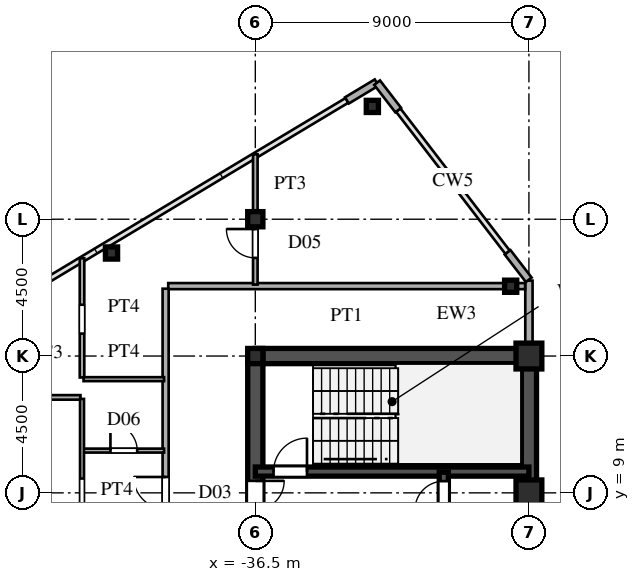
"""IFC4 building model, lengths in metres.
Left out: names, types, materials, properties, quantities, classifications, styles, units other than length and angle.
Written with IfcOpenShell. Run it as: python <this file> out.ifc"""

import sys

from ifc_helpers import new_model, si_unit, direction, frame, frame_2d, origin, origin_2d, place, context, subcontext, project, spatial, rectangle, hollow_rectangle, i_section, extrude, source, transform, mapped, element, fill, save


model = new_model("IFC4")
c1 = context("Model", 3, precision=1e-05, world=origin(), true_north=direction((0.0, 1.0)))
c2 = subcontext(c1, "Body", "Model", "MODEL_VIEW")
j1 = project(units=[si_unit("LENGTHUNIT", "METRE"), si_unit("PLANEANGLEUNIT", "RADIAN")], contexts=[c1])
p1 = place(None, origin())
s1 = spatial("IfcSite", under=j1, at=p1, CompositionType="ELEMENT")
p2 = place(p1, origin())
s2 = spatial("IfcBuilding", under=s1, at=p2, CompositionType="ELEMENT")
p3 = place(p2, frame((0.0, 0.0, 221.1)))
s3 = spatial("IfcBuildingStorey", under=s2, at=p3, CompositionType="ELEMENT", Elevation=221.1)
m1 = source(origin(), c2, "Body", "SweptSolid", [
    extrude(hollow_rectangle(XDim=0.85, YDim=0.85, WallThickness=0.036, at=origin_2d()), origin(), (0.0, 0.0, 1.0), 3.6),
])
for number, where, z_axis, x_axis in (
    (1, (-27.5, 9.0, 0.0), (0.0, 0.0, 1.0), (1.0, 0.0, 0.0)),
    (2, (-27.5, 13.5, 0.0), (0.0, 0.0, 1.0), (1.0, 0.0, 0.0)),
):
    element("IfcColumn", number, at=place(p3, frame(where, z_axis=z_axis, x_axis=x_axis)), inside=s3, PredefinedType="COLUMN", context=c2, shape_type="MappedRepresentation", body=[
        mapped(m1, transform((0.0, 0.0, 0.0), scale=1.0)),
    ])
m2 = source(origin(), c2, "Body", "SweptSolid", [
    extrude(i_section(OverallWidth=0.5, OverallDepth=0.5, WebThickness=0.02, FlangeThickness=0.032, at=origin_2d()), origin(), (0.0, 0.0, 1.0), 3.6),
])
for number, where, z_axis, x_axis in (
    (3, (-36.5, 13.5, 0.0), (0.0, 0.0, 1.0), (1.0, 0.0, 0.0)),
    (4, (-36.5, 18.0, 0.0), (0.0, 0.0, 1.0), (1.0, 0.0, 0.0)),
):
    element("IfcColumn", number, at=place(p3, frame(where, z_axis=z_axis, x_axis=x_axis)), inside=s3, PredefinedType="COLUMN", context=c2, shape_type="MappedRepresentation", body=[
        mapped(m2, transform((0.0, 0.0, 0.0), scale=1.0)),
    ])
m3 = source(origin(), c2, "Body", "SweptSolid", [
    extrude(hollow_rectangle(XDim=0.4, YDim=0.4, WallThickness=0.016, at=origin_2d()), origin(), (0.0, 0.0, 1.0), 3.6),
])
for number, where, z_axis, x_axis in (
    (5, (-28.1, 15.796, 0.0), (0.0, 0.0, 1.0), (1.0, 0.0, 0.0)),
    (6, (-32.65, 21.71, 0.0), (0.0, 0.0, 1.0), (1.0, 0.0, 0.0)),
    (7, (-41.23, 16.889, 0.0), (0.0, 0.0, 1.0), (1.0, 0.0, 0.0)),
):
    element("IfcColumn", number, at=place(p3, frame(where, z_axis=z_axis, x_axis=x_axis)), inside=s3, PredefinedType="COLUMN", context=c2, shape_type="MappedRepresentation", body=[
        mapped(m3, transform((0.0, 0.0, 0.0), scale=1.0)),
    ])
p4 = place(p3, frame((-27.5, 13.755, 0.0), z_axis=(0.0, 0.0, 1.0), x_axis=(0.0, 1.0, 0.0)))
e8 = element("IfcWall", 8, at=p4, inside=s3, PredefinedType="SOLIDWALL", context=c2, shape_type="SweptSolid", body=[
    extrude(rectangle(XDim=0.62, YDim=0.24, at=frame_2d((0.31, 0.0))), origin(), (0.0, 0.0, 1.0), 2.84),
])
p5 = place(p3, frame((-27.5, 14.375, 0.0), z_axis=(0.0, 0.0, 1.0), x_axis=(0.0, 1.0, 0.0)))
e9 = element("IfcWall", 9, at=p5, inside=s3, PredefinedType="SOLIDWALL", context=c2, shape_type="SweptSolid", body=[
    extrude(rectangle(XDim=1.605, YDim=0.24, at=frame_2d((0.803, 0.0))), origin(), (0.0, 0.0, 1.0), 3.34),
])
for number, where, z_axis, x_axis in (
    (10, (-27.506, 16.008, 0.0), (0.0, 0.0, 1.0), (-0.61, 0.793, 0.0)),
    (11, (-31.799, 21.588, 0.0), (0.0, 0.0, 1.0), (-0.61, 0.793, 0.0)),
    (12, (-32.509, 22.495, 0.0), (0.0, 0.0, 1.0), (-0.857, -0.515, 0.0)),
):
    element("IfcWall", number, at=place(p3, frame(where, z_axis=z_axis, x_axis=x_axis)), inside=s3, PredefinedType="SOLIDWALL", context=c2, shape_type="SweptSolid", body=[
        extrude(rectangle(XDim=1.14, YDim=0.24, at=frame_2d((0.57, 0.0))), origin(), (0.0, 0.0, 1.0), 3.34),
    ])
p6 = place(p3, frame((-27.5, 1.3, 0.0), z_axis=(0.0, 0.0, 1.0), x_axis=(0.0, 1.0, 0.0)))
e13 = element("IfcWall", 13, at=p6, inside=s3, PredefinedType="SHEAR", context=c2, shape_type="SweptSolid", body=[
    extrude(rectangle(XDim=12.2, YDim=0.5, at=frame_2d((6.1, 0.0))), origin(), (0.0, 0.0, 1.0), 3.34),
])
p7 = place(p3, frame((-36.5, 13.5, 0.0), z_axis=(0.0, 0.0, 1.0), x_axis=(1.0, 0.0, 0.0)))
e14 = element("IfcWall", 14, at=p7, inside=s3, PredefinedType="SHEAR", context=c2, shape_type="SweptSolid", body=[
    extrude(rectangle(XDim=9.0, YDim=0.5, at=frame_2d((4.5, 0.0))), origin(), (0.0, 0.0, 1.0), 3.34),
])
p8 = place(p3, frame((-36.5, 8.2, 0.0), z_axis=(0.0, 0.0, 1.0), x_axis=(0.0, 1.0, 0.0)))
e15 = element("IfcWall", 15, at=p8, inside=s3, PredefinedType="SHEAR", context=c2, shape_type="SweptSolid", body=[
    extrude(rectangle(XDim=5.45, YDim=0.5, at=frame_2d((2.725, 0.0))), origin(), (0.0, 0.0, 1.0), 3.34),
])
p9 = place(p8, frame((0.245, 0.0, 0.0)))
e16 = element("IfcOpeningElement", 16, at=p9, cuts=e15, PredefinedType="OPENING", context=c2, shape_type="SweptSolid", body=[
    extrude(rectangle(XDim=0.95, YDim=2.15, at=frame_2d((0.475, 1.075))), frame((0.0, 0.26, 0.0), z_axis=(0.0, -1.0, 0.0), x_axis=(1.0, 0.0, 0.0)), (0.0, 0.0, 1.0), 0.52),
])
p10 = place(p3, frame((-36.5, 9.7, 0.0), z_axis=(0.0, 0.0, 1.0), x_axis=(1.0, 0.0, 0.0)))
e17 = element("IfcWall", 17, at=p10, inside=s3, PredefinedType="SHEAR", context=c2, shape_type="SweptSolid", body=[
    extrude(rectangle(XDim=9.0, YDim=0.3, at=frame_2d((4.5, 0.0))), origin(), (0.0, 0.0, 1.0), 3.34),
])
p11 = place(p10, frame((0.6, 0.0, 0.0)))
e18 = element("IfcOpeningElement", 18, at=p11, cuts=e17, PredefinedType="OPENING", context=c2, shape_type="SweptSolid", body=[
    extrude(rectangle(XDim=1.1, YDim=2.2, at=frame_2d((0.55, 1.1))), frame((0.0, 0.16, 0.0), z_axis=(0.0, -1.0, 0.0), x_axis=(1.0, 0.0, 0.0)), (0.0, 0.0, 1.0), 0.32),
])
p12 = place(p3, frame((-30.3, 8.15, 0.0), z_axis=(0.0, 0.0, 1.0), x_axis=(0.0, 1.0, 0.0)))
e19 = element("IfcWall", 19, at=p12, inside=s3, PredefinedType="SHEAR", context=c2, shape_type="SweptSolid", body=[
    extrude(rectangle(XDim=1.53, YDim=0.3, at=frame_2d((0.765, 0.0))), origin(), (0.0, 0.0, 1.0), 3.34),
])
p13 = place(p12, frame((0.285, 0.0, 0.0)))
e20 = element("IfcOpeningElement", 20, at=p13, cuts=e19, PredefinedType="OPENING", context=c2, shape_type="SweptSolid", body=[
    extrude(rectangle(XDim=0.95, YDim=2.15, at=frame_2d((0.475, 1.075))), frame((0.0, 0.16, 0.0), z_axis=(0.0, -1.0, 0.0), x_axis=(1.0, 0.0, 0.0)), (0.0, 0.0, 1.0), 0.32),
])
p14 = place(p3, frame((-42.15, 10.39, 0.0), z_axis=(0.0, 0.0, 1.0), x_axis=(1.0, 0.0, 0.0)))
e21 = element("IfcWall", 21, at=p14, inside=s3, PredefinedType="PARTITIONING", context=c2, shape_type="SweptSolid", body=[
    extrude(rectangle(XDim=2.65, YDim=0.13, at=frame_2d((1.325, 0.0))), origin(), (0.0, 0.0, 1.0), 3.34),
])
p15 = place(p14, frame((0.885, 0.0, 0.0)))
e22 = element("IfcOpeningElement", 22, at=p15, cuts=e21, PredefinedType="OPENING", context=c2, shape_type="SweptSolid", body=[
    extrude(rectangle(XDim=0.88, YDim=2.1, at=frame_2d((0.44, 1.05))), frame((0.0, 0.075, 0.0), z_axis=(0.0, -1.0, 0.0), x_axis=(1.0, 0.0, 0.0)), (0.0, 0.0, 1.0), 0.15),
])
p16 = place(p3, frame((-49.802, 12.14, 0.0), z_axis=(0.0, 0.0, 1.0), x_axis=(1.0, 0.0, 0.0)))
e23 = element("IfcWall", 23, at=p16, inside=s3, PredefinedType="PARTITIONING", context=c2, shape_type="SweptSolid", body=[
    extrude(rectangle(XDim=7.552, YDim=0.15, at=frame_2d((3.776, 0.0))), origin(), (0.0, 0.0, 1.0), 3.34),
])
p17 = place(p16, frame((3.002, 0.0, 0.0)))
e24 = element("IfcOpeningElement", 24, at=p17, cuts=e23, PredefinedType="OPENING", context=c2, shape_type="SweptSolid", body=[
    extrude(rectangle(XDim=0.95, YDim=2.15, at=frame_2d((0.475, 1.075))), frame((0.0, 0.085, 0.0), z_axis=(0.0, -1.0, 0.0), x_axis=(1.0, 0.0, 0.0)), (0.0, 0.0, 1.0), 0.17),
])
p18 = place(p3, frame((-42.15, 12.74, 0.0), z_axis=(0.0, 0.0, 1.0), x_axis=(1.0, 0.0, 0.0)))
e25 = element("IfcWall", 25, at=p18, inside=s3, PredefinedType="PARTITIONING", context=c2, shape_type="SweptSolid", body=[
    extrude(rectangle(XDim=2.65, YDim=0.13, at=frame_2d((1.325, 0.0))), origin(), (0.0, 0.0, 1.0), 3.34),
])
p19 = place(p3, frame((-39.365, 15.8, 0.0), z_axis=(0.0, 0.0, 1.0), x_axis=(1.0, 0.0, 0.0)))
e26 = element("IfcWall", 26, at=p19, inside=s3, PredefinedType="PARTITIONING", context=c2, shape_type="SweptSolid", body=[
    extrude(rectangle(XDim=11.74, YDim=0.2, at=frame_2d((5.87, 0.0))), origin(), (0.0, 0.0, 1.0), 3.34),
])
p20 = place(p3, frame((-42.2, 3.812, 0.0), z_axis=(0.0, 0.0, 1.0), x_axis=(0.0, 1.0, 0.0)))
e27 = element("IfcWall", 27, at=p20, inside=s3, PredefinedType="PARTITIONING", context=c2, shape_type="SweptSolid", body=[
    extrude(rectangle(XDim=8.278, YDim=0.13, at=frame_2d((4.139, 0.0))), origin(), (0.0, 0.0, 1.0), 3.34),
])
p21 = place(p20, frame((4.71, 0.0, 0.0)))
e28 = element("IfcOpeningElement", 28, at=p21, cuts=e27, PredefinedType="OPENING", context=c2, shape_type="SweptSolid", body=[
    extrude(rectangle(XDim=0.95, YDim=2.15, at=frame_2d((0.475, 1.075))), frame((0.0, 0.075, 0.0), z_axis=(0.0, -1.0, 0.0), x_axis=(1.0, 0.0, 0.0)), (0.0, 0.0, 1.0), 0.15),
])
p22 = place(p3, frame((-42.2, 12.795, 0.0), z_axis=(0.0, 0.0, 1.0), x_axis=(0.0, 1.0, 0.0)))
e29 = element("IfcWall", 29, at=p22, inside=s3, PredefinedType="PARTITIONING", context=c2, shape_type="SweptSolid", body=[
    extrude(rectangle(XDim=3.92, YDim=0.15, at=frame_2d((1.96, 0.0))), origin(), (0.0, 0.0, 1.0), 3.34),
])
p23 = place(p22, frame((1.442, 0.0, 0.0)))
e30 = element("IfcOpeningElement", 30, at=p23, cuts=e29, PredefinedType="OPENING", context=c2, shape_type="SweptSolid", body=[
    extrude(rectangle(XDim=0.95, YDim=2.15, at=frame_2d((0.475, 1.075))), frame((0.0, 0.085, 0.0), z_axis=(0.0, -1.0, 0.0), x_axis=(1.0, 0.0, 0.0)), (0.0, 0.0, 1.0), 0.17),
])
p24 = place(p3, frame((-39.45, -15.715, 0.0), z_axis=(0.0, 0.0, 1.0), x_axis=(0.0, 1.0, 0.0)))
e31 = element("IfcWall", 31, at=p24, inside=s3, PredefinedType="PARTITIONING", context=c2, shape_type="SweptSolid", body=[
    extrude(rectangle(XDim=31.43, YDim=0.2, at=frame_2d((15.715, 0.0))), origin(), (0.0, 0.0, 1.0), 3.34),
])
p25 = place(p24, frame((4.69, 0.0, 0.0)))
e32 = element("IfcOpeningElement", 32, at=p25, cuts=e31, PredefinedType="OPENING", context=c2, shape_type="SweptSolid", body=[
    extrude(rectangle(XDim=1.05, YDim=2.25, at=frame_2d((0.525, 1.125))), frame((0.0, 0.11, 0.0), z_axis=(0.0, -1.0, 0.0), x_axis=(1.0, 0.0, 0.0)), (0.0, 0.0, 1.0), 0.22),
])
p26 = place(p24, frame((16.198, 0.0, 0.0)))
e33 = element("IfcOpeningElement", 33, at=p26, cuts=e31, PredefinedType="OPENING", context=c2, shape_type="SweptSolid", body=[
    extrude(rectangle(XDim=1.05, YDim=2.25, at=frame_2d((0.525, 1.125))), frame((0.0, 0.11, 0.0), z_axis=(0.0, -1.0, 0.0), x_axis=(1.0, 0.0, 0.0)), (0.0, 0.0, 1.0), 0.22),
])
p27 = place(p24, frame((24.188, 0.0, 0.0)))
e34 = element("IfcOpeningElement", 34, at=p27, cuts=e31, PredefinedType="OPENING", context=c2, shape_type="SweptSolid", body=[
    extrude(rectangle(XDim=1.05, YDim=2.25, at=frame_2d((0.525, 1.125))), frame((0.0, 0.11, 0.0), z_axis=(0.0, -1.0, 0.0), x_axis=(1.0, 0.0, 0.0)), (0.0, 0.0, 1.0), 0.22),
])
p28 = place(p3, frame((-36.5, 15.85, 0.0), z_axis=(0.0, 0.0, 1.0), x_axis=(0.0, 1.0, 0.0)))
e35 = element("IfcWall", 35, at=p28, inside=s3, PredefinedType="PARTITIONING", context=c2, shape_type="SweptSolid", body=[
    extrude(rectangle(XDim=2.17, YDim=0.15, at=frame_2d((1.085, 0.0))), origin(), (0.0, 0.0, 1.0), 2.44),
])
p29 = place(p28, frame((0.878, 0.0, 0.0)))
e36 = element("IfcOpeningElement", 36, at=p29, cuts=e35, PredefinedType="OPENING", context=c2, shape_type="SweptSolid", body=[
    extrude(rectangle(XDim=0.95, YDim=2.15, at=frame_2d((0.475, 1.075))), frame((0.0, 0.085, 0.0), z_axis=(0.0, -1.0, 0.0), x_axis=(1.0, 0.0, 0.0)), (0.0, 0.0, 1.0), 0.17),
])
p30 = place(p3, frame((-36.5, 18.02, 0.0), z_axis=(0.0, 0.0, 1.0), x_axis=(0.0, 1.0, 0.0)))
e37 = element("IfcWall", 37, at=p30, inside=s3, PredefinedType="PARTITIONING", context=c2, shape_type="SweptSolid", body=[
    extrude(rectangle(XDim=2.115, YDim=0.15, at=frame_2d((1.058, 0.0))), origin(), (0.0, 0.0, 1.0), 3.34),
])
m4 = source(origin(), c2, "Body", "SweptSolid", [
    extrude(rectangle(XDim=0.95, YDim=2.15, at=frame_2d((0.475, 1.075))), frame((0.0, 0.025, 0.0), z_axis=(0.0, -1.0, 0.0), x_axis=(1.0, 0.0, 0.0)), (0.0, 0.0, 1.0), 0.05),
])
p31 = place(p9, frame((0.95, 0.0, 0.0), z_axis=(0.0, 0.0, 1.0), x_axis=(-1.0, 0.0, 0.0)))
e38 = element("IfcDoor", 38, at=p31, inside=s3, OperationType="SINGLE_SWING_RIGHT", PredefinedType="DOOR", context=c2, shape_type="MappedRepresentation", body=[
    mapped(m4, transform((0.0, 0.0, 0.0), scale=1.0)),
])
fill(e16, e38)
m5 = source(origin(), c2, "Body", "SweptSolid", [
    extrude(rectangle(XDim=1.1, YDim=2.2, at=frame_2d((0.55, 1.1))), frame((0.0, 0.025, 0.0), z_axis=(0.0, -1.0, 0.0), x_axis=(1.0, 0.0, 0.0)), (0.0, 0.0, 1.0), 0.05),
])
p32 = place(p11, origin())
e39 = element("IfcDoor", 39, at=p32, inside=s3, OperationType="SINGLE_SWING_RIGHT", PredefinedType="DOOR", context=c2, shape_type="MappedRepresentation", body=[
    mapped(m5, transform((0.0, 0.0, 0.0), scale=1.0)),
])
fill(e18, e39)
p33 = place(p13, origin())
e40 = element("IfcDoor", 40, at=p33, inside=s3, OperationType="SINGLE_SWING_LEFT", PredefinedType="DOOR", context=c2, shape_type="MappedRepresentation", body=[
    mapped(m4, transform((0.0, 0.0, 0.0), scale=1.0)),
])
fill(e20, e40)
m6 = source(origin(), c2, "Body", "SweptSolid", [
    extrude(rectangle(XDim=0.88, YDim=2.1, at=frame_2d((0.44, 1.05))), frame((0.0, 0.025, 0.0), z_axis=(0.0, -1.0, 0.0), x_axis=(1.0, 0.0, 0.0)), (0.0, 0.0, 1.0), 0.05),
])
p34 = place(p15, origin())
e41 = element("IfcDoor", 41, at=p34, inside=s3, OperationType="SINGLE_SWING_LEFT", PredefinedType="DOOR", context=c2, shape_type="MappedRepresentation", body=[
    mapped(m6, transform((0.0, 0.0, 0.0), scale=1.0)),
])
fill(e22, e41)
m7 = source(origin(), c2, "Body", "SweptSolid", [
    extrude(rectangle(XDim=1.05, YDim=2.25, at=frame_2d((0.525, 1.125))), frame((0.0, 0.025, 0.0), z_axis=(0.0, -1.0, 0.0), x_axis=(1.0, 0.0, 0.0)), (0.0, 0.0, 1.0), 0.05),
])
p35 = place(p27, origin())
e42 = element("IfcDoor", 42, at=p35, inside=s3, OperationType="SINGLE_SWING_RIGHT", PredefinedType="DOOR", context=c2, shape_type="MappedRepresentation", body=[
    mapped(m7, transform((0.0, 0.0, 0.0), scale=1.0)),
])
fill(e34, e42)
m8 = source(origin(), c2, "Body", "SweptSolid", [
    extrude(rectangle(XDim=0.95, YDim=2.15, at=frame_2d((0.475, 1.075))), frame((0.0, 0.025, 0.0), z_axis=(0.0, -1.0, 0.0), x_axis=(1.0, 0.0, 0.0)), (0.0, 0.0, 1.0), 0.05),
])
p36 = place(p29, origin())
e43 = element("IfcDoor", 43, at=p36, inside=s3, OperationType="SINGLE_SWING_RIGHT", PredefinedType="DOOR", context=c2, shape_type="MappedRepresentation", body=[
    mapped(m8, transform((0.0, 0.0, 0.0), scale=1.0)),
])
fill(e36, e43)
save(model, sys.argv[1])
